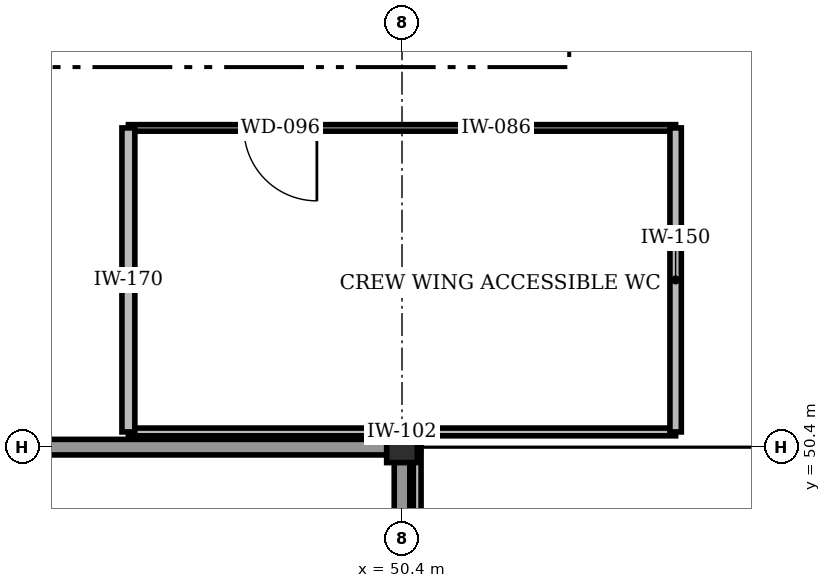
"""IFC4 building model, lengths in metres.
Left out: names, types, materials, properties, quantities, classifications, styles, units other than length and angle.
Written with IfcOpenShell. Run it as: python <this file> out.ifc"""

import sys

from ifc_helpers import new_model, si_unit, direction, frame, frame_2d, origin, origin_2d, place, context, subcontext, project, spatial, rectangle, i_section, extrude, element, fill, save


model = new_model("IFC4")
c1 = context("Model", 3, precision=1e-05, world=origin(), true_north=direction((0.0, 1.0)))
c2 = subcontext(c1, "Body", "Model", "MODEL_VIEW")
j1 = project(units=[si_unit("LENGTHUNIT", "METRE"), si_unit("PLANEANGLEUNIT", "RADIAN")], contexts=[c1])
p1 = place(None, origin())
s1 = spatial("IfcSite", under=j1, at=p1, CompositionType="ELEMENT")
p2 = place(p1, origin())
s2 = spatial("IfcBuilding", under=s1, at=p2, CompositionType="ELEMENT")
p3 = place(p2, frame((0.0, 0.0, 10.2)))
s3 = spatial("IfcBuildingStorey", under=s2, at=p3, CompositionType="ELEMENT", Elevation=10.2)
p4 = place(p3, frame((50.4, 50.4, 0.0), z_axis=(0.0, 0.0, 1.0), x_axis=(1.0, 0.0, 0.0)))
e1 = element("IfcColumn", 1, at=p4, inside=s3, PredefinedType="COLUMN", context=c2, shape_type="SweptSolid", body=[
    extrude(i_section(OverallWidth=0.404, OverallDepth=0.407, WebThickness=0.027, FlangeThickness=0.044, at=origin_2d()), origin(), (0.0, 0.0, 1.0), 4.2),
])
p5 = place(p3, frame((36.0, 50.4, 0.0), z_axis=(0.0, 0.0, 1.0), x_axis=(1.0, 0.0, 0.0)))
e2 = element("IfcWall", 2, at=p5, inside=s3, PredefinedType="STANDARD", context=c2, shape_type="SweptSolid", body=[
    extrude(rectangle(XDim=14.4, YDim=0.205, at=frame_2d((7.2, 0.0))), origin(), (0.0, 0.0, 1.0), 4.2),
])
p6 = place(p3, frame((50.4, 50.4, 0.0), z_axis=(0.0, 0.0, 1.0), x_axis=(0.0, -1.0, 0.0)))
e3 = element("IfcWall", 3, at=p6, inside=s3, PredefinedType="STANDARD", context=c2, shape_type="SweptSolid", body=[
    extrude(rectangle(XDim=28.8, YDim=0.205, at=frame_2d((14.4, 0.0))), origin(), (0.0, 0.0, 1.0), 4.2),
])
p7 = place(p3, frame((46.8, 50.6, 0.0), z_axis=(0.0, 0.0, 1.0), x_axis=(1.0, 0.0, 0.0)))
e4 = element("IfcWall", 4, at=p7, inside=s3, PredefinedType="STANDARD", context=c2, shape_type="SweptSolid", body=[
    extrude(rectangle(XDim=7.2, YDim=0.102, at=frame_2d((3.6, 0.0))), origin(), (0.0, 0.0, 1.0), 3.95),
])
p8 = place(p3, frame((54.0, 54.6, 0.0), z_axis=(0.0, 0.0, 1.0), x_axis=(-1.0, 0.0, 0.0)))
e5 = element("IfcWall", 5, at=p8, inside=s3, PredefinedType="STANDARD", context=c2, shape_type="SweptSolid", body=[
    extrude(rectangle(XDim=7.2, YDim=0.086, at=frame_2d((3.6, 0.0))), origin(), (0.0, 0.0, 1.0), 3.95),
])
p9 = place(p8, frame((4.72, 0.0, 0.0)))
e6 = element("IfcOpeningElement", 6, at=p9, cuts=e5, PredefinedType="OPENING", context=c2, shape_type="SweptSolid", body=[
    extrude(rectangle(XDim=0.96, YDim=2.1, at=frame_2d((0.48, 1.05))), frame((0.0, 0.053, 0.0), z_axis=(0.0, -1.0, 0.0), x_axis=(1.0, 0.0, 0.0)), (0.0, 0.0, 1.0), 0.106),
])
p10 = place(p3, frame((46.8, 54.6, 0.0), z_axis=(0.0, 0.0, 1.0), x_axis=(0.0, -1.0, 0.0)))
e7 = element("IfcWall", 7, at=p10, inside=s3, PredefinedType="STANDARD", context=c2, shape_type="SweptSolid", body=[
    extrude(rectangle(XDim=4.0, YDim=0.17, at=frame_2d((2.0, 0.0))), origin(), (0.0, 0.0, 1.0), 3.95),
])
p11 = place(p3, frame((54.0, 50.6, 0.0), z_axis=(0.0, 0.0, 1.0), x_axis=(0.0, 1.0, 0.0)))
e8 = element("IfcWall", 8, at=p11, inside=s3, PredefinedType="STANDARD", context=c2, shape_type="SweptSolid", body=[
    extrude(rectangle(XDim=4.0, YDim=0.15, at=frame_2d((2.0, 0.0))), origin(), (0.0, 0.0, 1.0), 3.95),
])
p12 = place(p3, frame((50.6, 50.6, 0.0), z_axis=(0.0, 0.0, 1.0), x_axis=(0.0, -1.0, 0.0)))
e9 = element("IfcWall", 9, at=p12, inside=s3, PredefinedType="STANDARD", context=c2, shape_type="SweptSolid", body=[
    extrude(rectangle(XDim=28.7, YDim=0.102, at=frame_2d((14.35, 0.0))), origin(), (0.0, 0.0, 1.0), 3.95),
])
p13 = place(p9, origin())
e10 = element("IfcDoor", 10, at=p13, inside=s3, OperationType="SINGLE_SWING_LEFT", PredefinedType="DOOR", context=c2, shape_type="SweptSolid", body=[
    extrude(rectangle(XDim=0.96, YDim=2.1, at=frame_2d((0.48, 1.05))), frame((0.0, 0.025, 0.0), z_axis=(0.0, -1.0, 0.0), x_axis=(1.0, 0.0, 0.0)), (0.0, 0.0, 1.0), 0.05),
])
fill(e6, e10)
save(model, sys.argv[1])
